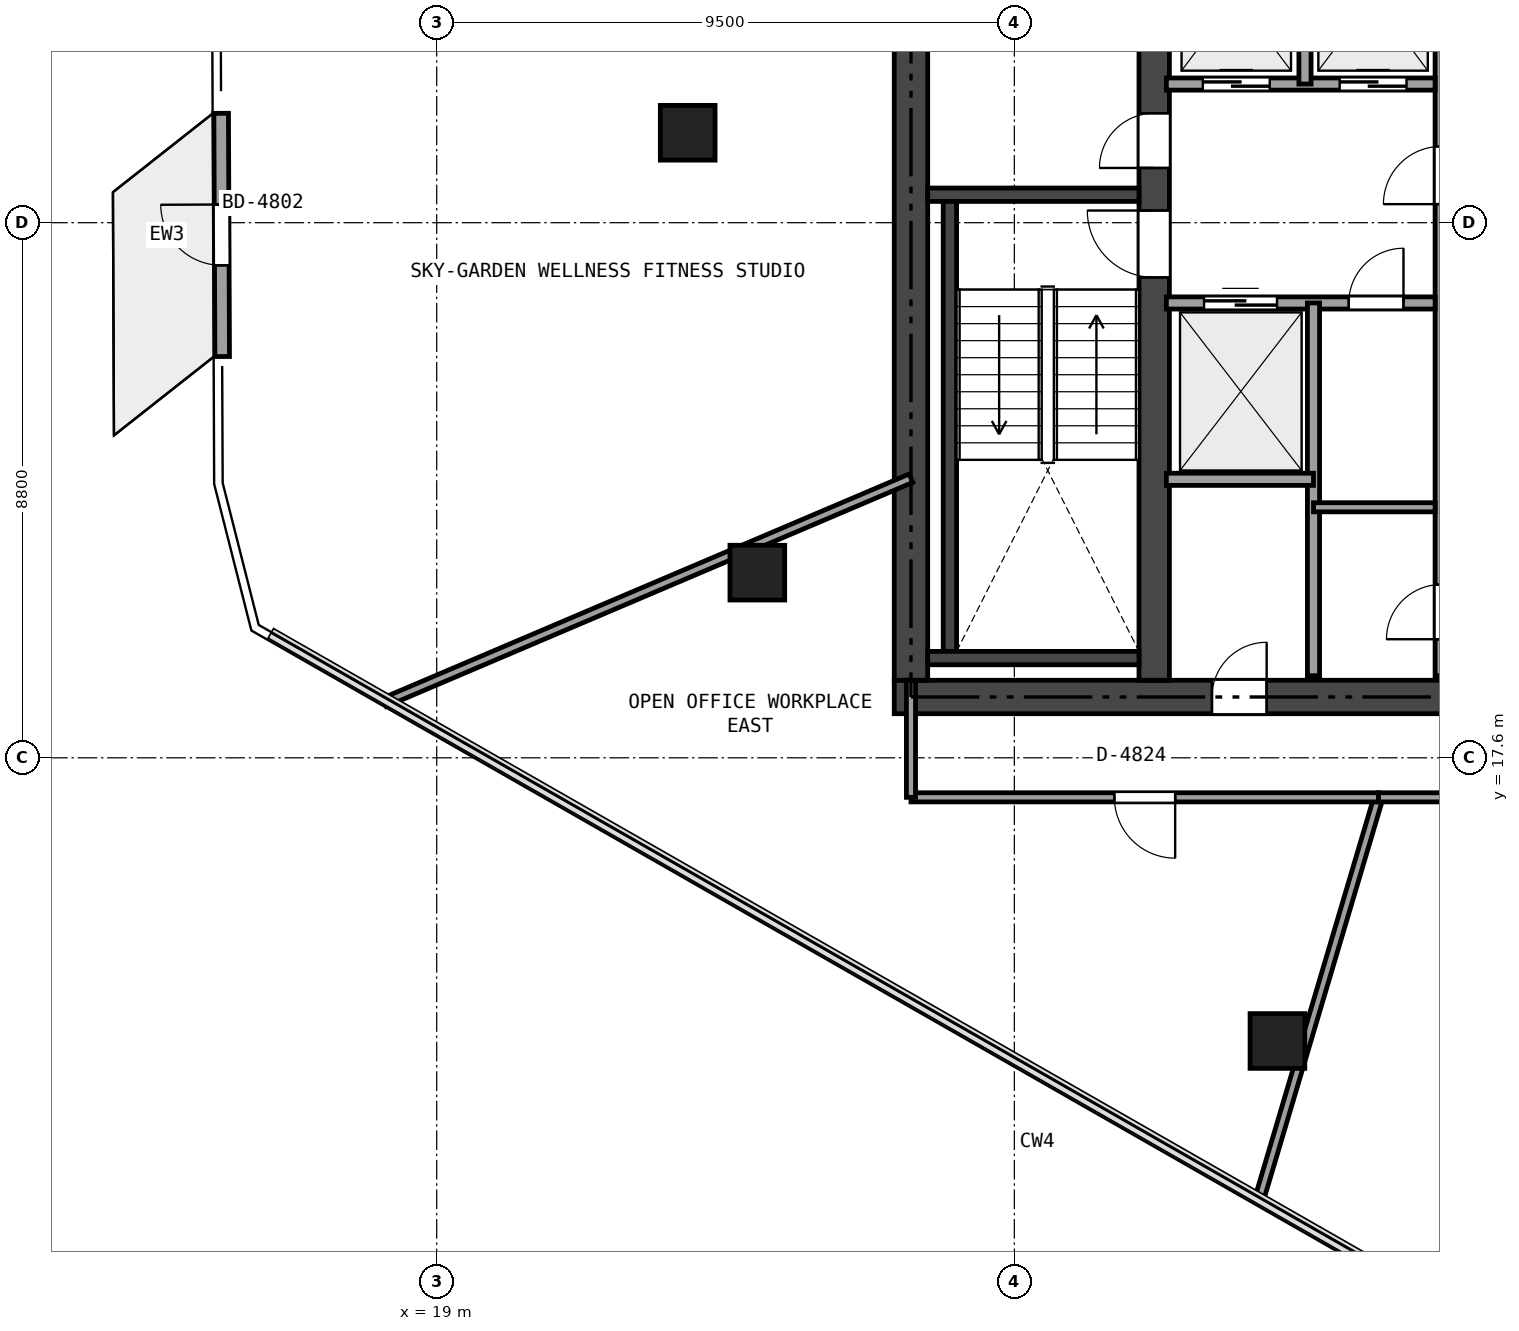
"""IFC4 building model, lengths in metres.
Left out: names, types, materials, properties, quantities, classifications, styles, units other than length and angle.
Written with IfcOpenShell. Run it as: python <this file> out.ifc"""

import sys

from ifc_helpers import new_model, si_unit, direction, frame, frame_2d, origin, origin_2d, place, context, subcontext, project, spatial, rectangle, extrude, element, fill, save


model = new_model("IFC4")
c1 = context("Model", 3, precision=1e-05, world=origin(), true_north=direction((0.0, 1.0)))
c2 = subcontext(c1, "Body", "Model", "MODEL_VIEW")
j1 = project(units=[si_unit("LENGTHUNIT", "METRE"), si_unit("PLANEANGLEUNIT", "RADIAN")], contexts=[c1])
p1 = place(None, origin())
s1 = spatial("IfcSite", under=j1, at=p1, CompositionType="ELEMENT")
p2 = place(p1, origin())
s2 = spatial("IfcBuilding", under=s1, at=p2, CompositionType="ELEMENT")
p3 = place(p2, frame((0.0, 0.0, 180.6)))
s3 = spatial("IfcBuildingStorey", under=s2, at=p3, CompositionType="ELEMENT", Elevation=180.6)
p4 = place(p3, frame((26.525, 18.6, 0.0), z_axis=(0.0, 0.0, 1.0), x_axis=(1.0, 0.0, 0.0)))
e1 = element("IfcWall", 1, at=p4, inside=s3, PredefinedType="SHEAR", context=c2, shape_type="SweptSolid", body=[
    extrude(rectangle(XDim=21.35, YDim=0.55, at=frame_2d((10.675, 0.0))), origin(), (0.0, 0.0, 1.0), 3.32),
])
p5 = place(p4, frame((12.4, 0.0, 0.0)))
e2 = element("IfcOpeningElement", 2, at=p5, cuts=e1, PredefinedType="OPENING", context=c2, shape_type="SweptSolid", body=[
    extrude(rectangle(XDim=1.15, YDim=2.15, at=frame_2d((0.575, 1.075))), frame((0.0, 0.285, 0.0), z_axis=(0.0, -1.0, 0.0), x_axis=(1.0, 0.0, 0.0)), (0.0, 0.0, 1.0), 0.57),
])
p6 = place(p4, frame((5.225, 0.0, 0.0)))
e3 = element("IfcOpeningElement", 3, at=p6, cuts=e1, PredefinedType="OPENING", context=c2, shape_type="SweptSolid", body=[
    extrude(rectangle(XDim=0.9, YDim=2.1, at=frame_2d((0.45, 1.05))), frame((0.0, 0.285, 0.0), z_axis=(0.0, -1.0, 0.0), x_axis=(1.0, 0.0, 0.0)), (0.0, 0.0, 1.0), 0.57),
])
p7 = place(p3, frame((26.8, 18.875, 0.0), z_axis=(0.0, 0.0, 1.0), x_axis=(0.0, 1.0, 0.0)))
e4 = element("IfcWall", 4, at=p7, inside=s3, PredefinedType="SHEAR", context=c2, shape_type="SweptSolid", body=[
    extrude(rectangle(XDim=15.05, YDim=0.55, at=frame_2d((7.525, 0.0))), origin(), (0.0, 0.0, 1.0), 3.32),
])
p8 = place(p3, frame((30.8, 18.875, 0.0), z_axis=(0.0, 0.0, 1.0), x_axis=(0.0, 1.0, 0.0)))
e5 = element("IfcWall", 5, at=p8, inside=s3, PredefinedType="SHEAR", context=c2, shape_type="SweptSolid", body=[
    extrude(rectangle(XDim=15.05, YDim=0.5, at=frame_2d((7.525, 0.0))), origin(), (0.0, 0.0, 1.0), 3.32),
])
p9 = place(p8, frame((6.625, 0.0, 0.0)))
e6 = element("IfcOpeningElement", 6, at=p9, cuts=e5, PredefinedType="OPENING", context=c2, shape_type="SweptSolid", body=[
    extrude(rectangle(XDim=1.1, YDim=2.15, at=frame_2d((0.55, 1.075))), frame((0.0, 0.26, 0.0), z_axis=(0.0, -1.0, 0.0), x_axis=(1.0, 0.0, 0.0)), (0.0, 0.0, 1.0), 0.52),
])
p10 = place(p8, frame((8.425, 0.0, 0.0)))
e7 = element("IfcOpeningElement", 7, at=p10, cuts=e5, PredefinedType="OPENING", context=c2, shape_type="SweptSolid", body=[
    extrude(rectangle(XDim=0.9, YDim=2.1, at=frame_2d((0.45, 1.05))), frame((0.0, 0.26, 0.0), z_axis=(0.0, -1.0, 0.0), x_axis=(1.0, 0.0, 0.0)), (0.0, 0.0, 1.0), 0.52),
])
p11 = place(p3, frame((27.075, 26.86, 0.0), z_axis=(0.0, 0.0, 1.0), x_axis=(1.0, 0.0, 0.0)))
e8 = element("IfcWall", 8, at=p11, inside=s3, PredefinedType="SHEAR", context=c2, shape_type="SweptSolid", body=[
    extrude(rectangle(XDim=3.475, YDim=0.22, at=frame_2d((1.738, 0.0))), origin(), (0.0, 0.0, 1.0), 3.32),
])
p12 = place(p3, frame((27.44, 19.35, 0.0), z_axis=(0.0, 0.0, 1.0), x_axis=(0.0, 1.0, 0.0)))
e9 = element("IfcWall", 9, at=p12, inside=s3, PredefinedType="SHEAR", context=c2, shape_type="SweptSolid", body=[
    extrude(rectangle(XDim=7.4, YDim=0.22, at=frame_2d((3.7, 0.0))), origin(), (0.0, 0.0, 1.0), 3.32),
])
p13 = place(p3, frame((27.075, 19.24, 0.0), z_axis=(0.0, 0.0, 1.0), x_axis=(1.0, 0.0, 0.0)))
e10 = element("IfcWall", 10, at=p13, inside=s3, PredefinedType="SHEAR", context=c2, shape_type="SweptSolid", body=[
    extrude(rectangle(XDim=3.475, YDim=0.22, at=frame_2d((1.738, 0.0))), origin(), (0.0, 0.0, 1.0), 3.32),
])
for number, where, z_axis, x_axis in (
    (11, (23.128, 27.879, 0.0), (0.0, 0.0, 1.0), (1.0, 0.0, 0.0)),
    (12, (24.273, 20.645, 0.0), (0.0, 0.0, 1.0), (1.0, 0.0, 0.0)),
    (13, (32.827, 12.943, 0.0), (0.0, 0.0, 1.0), (1.0, 0.0, 0.0)),
):
    element("IfcColumn", number, at=place(p3, frame(where, z_axis=z_axis, x_axis=x_axis)), inside=s3, PredefinedType="COLUMN", context=c2, shape_type="SweptSolid", body=[
        extrude(rectangle(XDim=0.9, YDim=0.9, at=origin_2d()), origin(), (0.0, 0.0, 1.0), 3.32),
    ])
p14 = place(p3, frame((15.472, 24.199, 0.0), z_axis=(0.0, 0.0, 1.0), x_axis=(-0.004211388435, 0.999991132064, 0.0)))
e14 = element("IfcWall", 14, at=p14, inside=s3, PredefinedType="SOLIDWALL", context=c2, shape_type="SweptSolid", body=[
    extrude(rectangle(XDim=4.0, YDim=0.24, at=frame_2d((2.0, 0.0))), origin(), (0.0, 0.0, 1.0), 3.32),
])
p15 = place(p14, frame((1.5, 0.0, 0.0)))
e15 = element("IfcOpeningElement", 15, at=p15, cuts=e14, PredefinedType="OPENING", context=c2, shape_type="SweptSolid", body=[
    extrude(rectangle(XDim=1.0, YDim=2.15, at=frame_2d((0.5, 1.075))), frame((0.0, 0.13, 0.0), z_axis=(0.0, -1.0, 0.0), x_axis=(1.0, 0.0, 0.0)), (0.0, 0.0, 1.0), 0.26),
])
p16 = place(p3, frame((35.52, 18.95, 0.0), z_axis=(0.0, 0.0, 1.0), x_axis=(0.0, 1.0, 0.0)))
e16 = element("IfcWall", 16, at=p16, inside=s3, PredefinedType="SOLIDWALL", context=c2, shape_type="SweptSolid", body=[
    extrude(rectangle(XDim=14.9, YDim=0.2, at=frame_2d((7.45, 0.0))), origin(), (0.0, 0.0, 1.0), 2.841),
])
p17 = place(p16, frame((7.755, 0.0, 0.0)))
e17 = element("IfcOpeningElement", 17, at=p17, cuts=e16, PredefinedType="OPENING", context=c2, shape_type="SweptSolid", body=[
    extrude(rectangle(XDim=0.95, YDim=2.15, at=frame_2d((0.475, 1.075))), frame((0.0, 0.11, 0.0), z_axis=(0.0, -1.0, 0.0), x_axis=(1.0, 0.0, 0.0)), (0.0, 0.0, 1.0), 0.22),
])
p18 = place(p16, frame((0.6, 0.0, 0.0)))
e18 = element("IfcOpeningElement", 18, at=p18, cuts=e16, PredefinedType="OPENING", context=c2, shape_type="SweptSolid", body=[
    extrude(rectangle(XDim=0.9, YDim=2.1, at=frame_2d((0.45, 1.05))), frame((0.0, 0.11, 0.0), z_axis=(0.0, -1.0, 0.0), x_axis=(1.0, 0.0, 0.0)), (0.0, 0.0, 1.0), 0.22),
])
p19 = place(p3, frame((31.0, 28.68, 0.0), z_axis=(0.0, 0.0, 1.0), x_axis=(1.0, 0.0, 0.0)))
e19 = element("IfcWall", 19, at=p19, inside=s3, PredefinedType="SOLIDWALL", context=c2, shape_type="SweptSolid", body=[
    extrude(rectangle(XDim=4.42, YDim=0.2, at=frame_2d((2.21, 0.0))), origin(), (0.0, 0.0, 1.0), 3.32),
])
p20 = place(p19, frame((0.6, 0.0, 0.0)))
e20 = element("IfcOpeningElement", 20, at=p20, cuts=e19, PredefinedType="OPENING", context=c2, shape_type="SweptSolid", body=[
    extrude(rectangle(XDim=1.1, YDim=2.15, at=frame_2d((0.55, 1.075))), frame((0.0, 0.11, 0.0), z_axis=(0.0, -1.0, 0.0), x_axis=(1.0, 0.0, 0.0)), (0.0, 0.0, 1.0), 0.22),
])
p21 = place(p19, frame((2.85, 0.0, 0.0)))
e21 = element("IfcOpeningElement", 21, at=p21, cuts=e19, PredefinedType="OPENING", context=c2, shape_type="SweptSolid", body=[
    extrude(rectangle(XDim=1.1, YDim=2.15, at=frame_2d((0.55, 1.075))), frame((0.0, 0.11, 0.0), z_axis=(0.0, -1.0, 0.0), x_axis=(1.0, 0.0, 0.0)), (0.0, 0.0, 1.0), 0.22),
])
p22 = place(p3, frame((33.28, 28.68, 0.0), z_axis=(0.0, 0.0, 1.0), x_axis=(0.0, 1.0, 0.0)))
e22 = element("IfcWall", 22, at=p22, inside=s3, PredefinedType="SOLIDWALL", context=c2, shape_type="SweptSolid", body=[
    extrude(rectangle(XDim=2.82, YDim=0.2, at=frame_2d((1.41, 0.0))), origin(), (0.0, 0.0, 1.0), 3.32),
])
p23 = place(p3, frame((31.0, 25.08, 0.0), z_axis=(0.0, 0.0, 1.0), x_axis=(1.0, 0.0, 0.0)))
e23 = element("IfcWall", 23, at=p23, inside=s3, PredefinedType="SOLIDWALL", context=c2, shape_type="SweptSolid", body=[
    extrude(rectangle(XDim=4.42, YDim=0.2, at=frame_2d((2.21, 0.0))), origin(), (0.0, 0.0, 1.0), 3.32),
])
p24 = place(p23, frame((3.0, 0.0, 0.0)))
e24 = element("IfcOpeningElement", 24, at=p24, cuts=e23, PredefinedType="OPENING", context=c2, shape_type="SweptSolid", body=[
    extrude(rectangle(XDim=0.9, YDim=2.1, at=frame_2d((0.45, 1.05))), frame((0.0, 0.11, 0.0), z_axis=(0.0, -1.0, 0.0), x_axis=(1.0, 0.0, 0.0)), (0.0, 0.0, 1.0), 0.22),
])
p25 = place(p23, frame((0.62, 0.0, 0.0)))
e25 = element("IfcOpeningElement", 25, at=p25, cuts=e23, PredefinedType="OPENING", context=c2, shape_type="SweptSolid", body=[
    extrude(rectangle(XDim=1.2, YDim=2.15, at=frame_2d((0.6, 1.075))), frame((0.0, 0.11, 0.0), z_axis=(0.0, -1.0, 0.0), x_axis=(1.0, 0.0, 0.0)), (0.0, 0.0, 1.0), 0.22),
])
p26 = place(p3, frame((33.42, 18.95, 0.0), z_axis=(0.0, 0.0, 1.0), x_axis=(0.0, 1.0, 0.0)))
e26 = element("IfcWall", 26, at=p26, inside=s3, PredefinedType="SOLIDWALL", context=c2, shape_type="SweptSolid", body=[
    extrude(rectangle(XDim=6.13, YDim=0.2, at=frame_2d((3.065, 0.0))), origin(), (0.0, 0.0, 1.0), 2.841),
])
p27 = place(p3, frame((31.0, 22.18, 0.0), z_axis=(0.0, 0.0, 1.0), x_axis=(1.0, 0.0, 0.0)))
e27 = element("IfcWall", 27, at=p27, inside=s3, PredefinedType="SOLIDWALL", context=c2, shape_type="SweptSolid", body=[
    extrude(rectangle(XDim=2.42, YDim=0.2, at=frame_2d((1.21, 0.0))), origin(), (0.0, 0.0, 1.0), 3.32),
])
p28 = place(p3, frame((33.42, 21.72, 0.0), z_axis=(0.0, 0.0, 1.0), x_axis=(1.0, 0.0, 0.0)))
e28 = element("IfcWall", 28, at=p28, inside=s3, PredefinedType="PARTITIONING", context=c2, shape_type="SweptSolid", body=[
    extrude(rectangle(XDim=2.0, YDim=0.15, at=frame_2d((1.0, 0.0))), origin(), (0.0, 0.0, 1.0), 3.32),
])
p29 = place(p3, frame((18.142, 18.514, 0.0), z_axis=(0.0, 0.0, 1.0), x_axis=(0.920160602649, 0.391541141302, 0.0)))
e29 = element("IfcWall", 29, at=p29, inside=s3, PredefinedType="PARTITIONING", context=c2, shape_type="SweptSolid", body=[
    extrude(rectangle(XDim=9.409, YDim=0.15, at=frame_2d((4.705, 0.0))), origin(), (0.0, 0.0, 1.0), 2.905),
])
p30 = place(p3, frame((32.518, 10.311, 0.0), z_axis=(0.0, 0.0, 1.0), x_axis=(0.284730403607, 0.958607634677, 0.0)))
e30 = element("IfcWall", 30, at=p30, inside=s3, PredefinedType="PARTITIONING", context=c2, shape_type="SweptSolid", body=[
    extrude(rectangle(XDim=6.926, YDim=0.15, at=frame_2d((3.463, 0.0))), origin(), (0.0, 0.0, 1.0), 2.905),
])
p31 = place(p3, frame((34.49, 16.95, 0.0), z_axis=(0.0, 0.0, 1.0), x_axis=(-1.0, 0.0, 0.0)))
e31 = element("IfcWall", 31, at=p31, inside=s3, PredefinedType="PARTITIONING", context=c2, shape_type="SweptSolid", body=[
    extrude(rectangle(XDim=7.69, YDim=0.15, at=frame_2d((3.845, 0.0))), origin(), (0.0, 0.0, 1.0), 2.697),
])
p32 = place(p31, frame((3.345, 0.0, 0.0)))
e32 = element("IfcOpeningElement", 32, at=p32, cuts=e31, PredefinedType="OPENING", context=c2, shape_type="SweptSolid", body=[
    extrude(rectangle(XDim=1.0, YDim=2.15, at=frame_2d((0.5, 1.075))), frame((0.0, 0.085, 0.0), z_axis=(0.0, -1.0, 0.0), x_axis=(1.0, 0.0, 0.0)), (0.0, 0.0, 1.0), 0.17),
])
p33 = place(p3, frame((26.8, 16.95, 0.0), z_axis=(0.0, 0.0, 1.0), x_axis=(0.0, 1.0, 0.0)))
e33 = element("IfcWall", 33, at=p33, inside=s3, PredefinedType="PARTITIONING", context=c2, shape_type="SweptSolid", body=[
    extrude(rectangle(XDim=1.925, YDim=0.15, at=frame_2d((0.962, 0.0))), origin(), (0.0, 0.0, 1.0), 2.905),
])
p34 = place(p3, frame((44.583, 16.95, 0.0), z_axis=(0.0, 0.0, 1.0), x_axis=(-1.0, 0.0, 0.0)))
e34 = element("IfcWall", 34, at=p34, inside=s3, PredefinedType="PARTITIONING", context=c2, shape_type="SweptSolid", body=[
    extrude(rectangle(XDim=10.093, YDim=0.15, at=frame_2d((5.046, 0.0))), origin(), (0.0, 0.0, 1.0), 2.697),
])
p35 = place(p34, frame((4.546, 0.0, 0.0)))
e35 = element("IfcOpeningElement", 35, at=p35, cuts=e34, PredefinedType="OPENING", context=c2, shape_type="SweptSolid", body=[
    extrude(rectangle(XDim=1.0, YDim=2.15, at=frame_2d((0.5, 1.075))), frame((0.0, 0.085, 0.0), z_axis=(0.0, -1.0, 0.0), x_axis=(1.0, 0.0, 0.0)), (0.0, 0.0, 1.0), 0.17),
])
p36 = place(p15, origin())
e36 = element("IfcDoor", 36, at=p36, inside=s3, OperationType="SINGLE_SWING_RIGHT", PredefinedType="DOOR", context=c2, shape_type="SweptSolid", body=[
    extrude(rectangle(XDim=1.0, YDim=2.15, at=frame_2d((0.5, 1.075))), frame((0.0, 0.025, 0.0), z_axis=(0.0, -1.0, 0.0), x_axis=(1.0, 0.0, 0.0)), (0.0, 0.0, 1.0), 0.05),
])
fill(e15, e36)
p37 = place(p9, origin())
e37 = element("IfcDoor", 37, at=p37, inside=s3, OperationType="SINGLE_SWING_RIGHT", PredefinedType="DOOR", context=c2, shape_type="SweptSolid", body=[
    extrude(rectangle(XDim=1.1, YDim=2.15, at=frame_2d((0.55, 1.075))), frame((0.0, 0.025, 0.0), z_axis=(0.0, -1.0, 0.0), x_axis=(1.0, 0.0, 0.0)), (0.0, 0.0, 1.0), 0.05),
])
fill(e6, e37)
p38 = place(p10, origin())
e38 = element("IfcDoor", 38, at=p38, inside=s3, OperationType="SINGLE_SWING_LEFT", PredefinedType="DOOR", context=c2, shape_type="SweptSolid", body=[
    extrude(rectangle(XDim=0.9, YDim=2.1, at=frame_2d((0.45, 1.05))), frame((0.0, 0.025, 0.0), z_axis=(0.0, -1.0, 0.0), x_axis=(1.0, 0.0, 0.0)), (0.0, 0.0, 1.0), 0.05),
])
fill(e7, e38)
p39 = place(p6, origin())
e39 = element("IfcDoor", 39, at=p39, inside=s3, OperationType="SINGLE_SWING_RIGHT", PredefinedType="DOOR", context=c2, shape_type="SweptSolid", body=[
    extrude(rectangle(XDim=0.9, YDim=2.1, at=frame_2d((0.45, 1.05))), frame((0.0, 0.025, 0.0), z_axis=(0.0, -1.0, 0.0), x_axis=(1.0, 0.0, 0.0)), (0.0, 0.0, 1.0), 0.05),
])
fill(e3, e39)
p40 = place(p24, origin())
e40 = element("IfcDoor", 40, at=p40, inside=s3, OperationType="SINGLE_SWING_RIGHT", PredefinedType="DOOR", context=c2, shape_type="SweptSolid", body=[
    extrude(rectangle(XDim=0.9, YDim=2.1, at=frame_2d((0.45, 1.05))), frame((0.0, 0.025, 0.0), z_axis=(0.0, -1.0, 0.0), x_axis=(1.0, 0.0, 0.0)), (0.0, 0.0, 1.0), 0.05),
])
fill(e24, e40)
p41 = place(p20, origin())
e41 = element("IfcDoor", 41, at=p41, inside=s3, OperationType="SLIDING_TO_LEFT", PredefinedType="DOOR", context=c2, shape_type="SweptSolid", body=[
    extrude(rectangle(XDim=1.1, YDim=2.15, at=frame_2d((0.55, 1.075))), frame((0.0, 0.025, 0.0), z_axis=(0.0, -1.0, 0.0), x_axis=(1.0, 0.0, 0.0)), (0.0, 0.0, 1.0), 0.05),
])
fill(e20, e41)
p42 = place(p21, origin())
e42 = element("IfcDoor", 42, at=p42, inside=s3, OperationType="SLIDING_TO_LEFT", PredefinedType="DOOR", context=c2, shape_type="SweptSolid", body=[
    extrude(rectangle(XDim=1.1, YDim=2.15, at=frame_2d((0.55, 1.075))), frame((0.0, 0.025, 0.0), z_axis=(0.0, -1.0, 0.0), x_axis=(1.0, 0.0, 0.0)), (0.0, 0.0, 1.0), 0.05),
])
fill(e21, e42)
p43 = place(p25, origin())
e43 = element("IfcDoor", 43, at=p43, inside=s3, OperationType="SLIDING_TO_LEFT", PredefinedType="DOOR", context=c2, shape_type="SweptSolid", body=[
    extrude(rectangle(XDim=1.2, YDim=2.15, at=frame_2d((0.6, 1.075))), frame((0.0, 0.025, 0.0), z_axis=(0.0, -1.0, 0.0), x_axis=(1.0, 0.0, 0.0)), (0.0, 0.0, 1.0), 0.05),
])
fill(e25, e43)
p44 = place(p32, origin())
e44 = element("IfcDoor", 44, at=p44, inside=s3, OperationType="SINGLE_SWING_LEFT", PredefinedType="DOOR", context=c2, shape_type="SweptSolid", body=[
    extrude(rectangle(XDim=1.0, YDim=2.15, at=frame_2d((0.5, 1.075))), frame((0.0, 0.025, 0.0), z_axis=(0.0, -1.0, 0.0), x_axis=(1.0, 0.0, 0.0)), (0.0, 0.0, 1.0), 0.05),
])
fill(e32, e44)
save(model, sys.argv[1])
